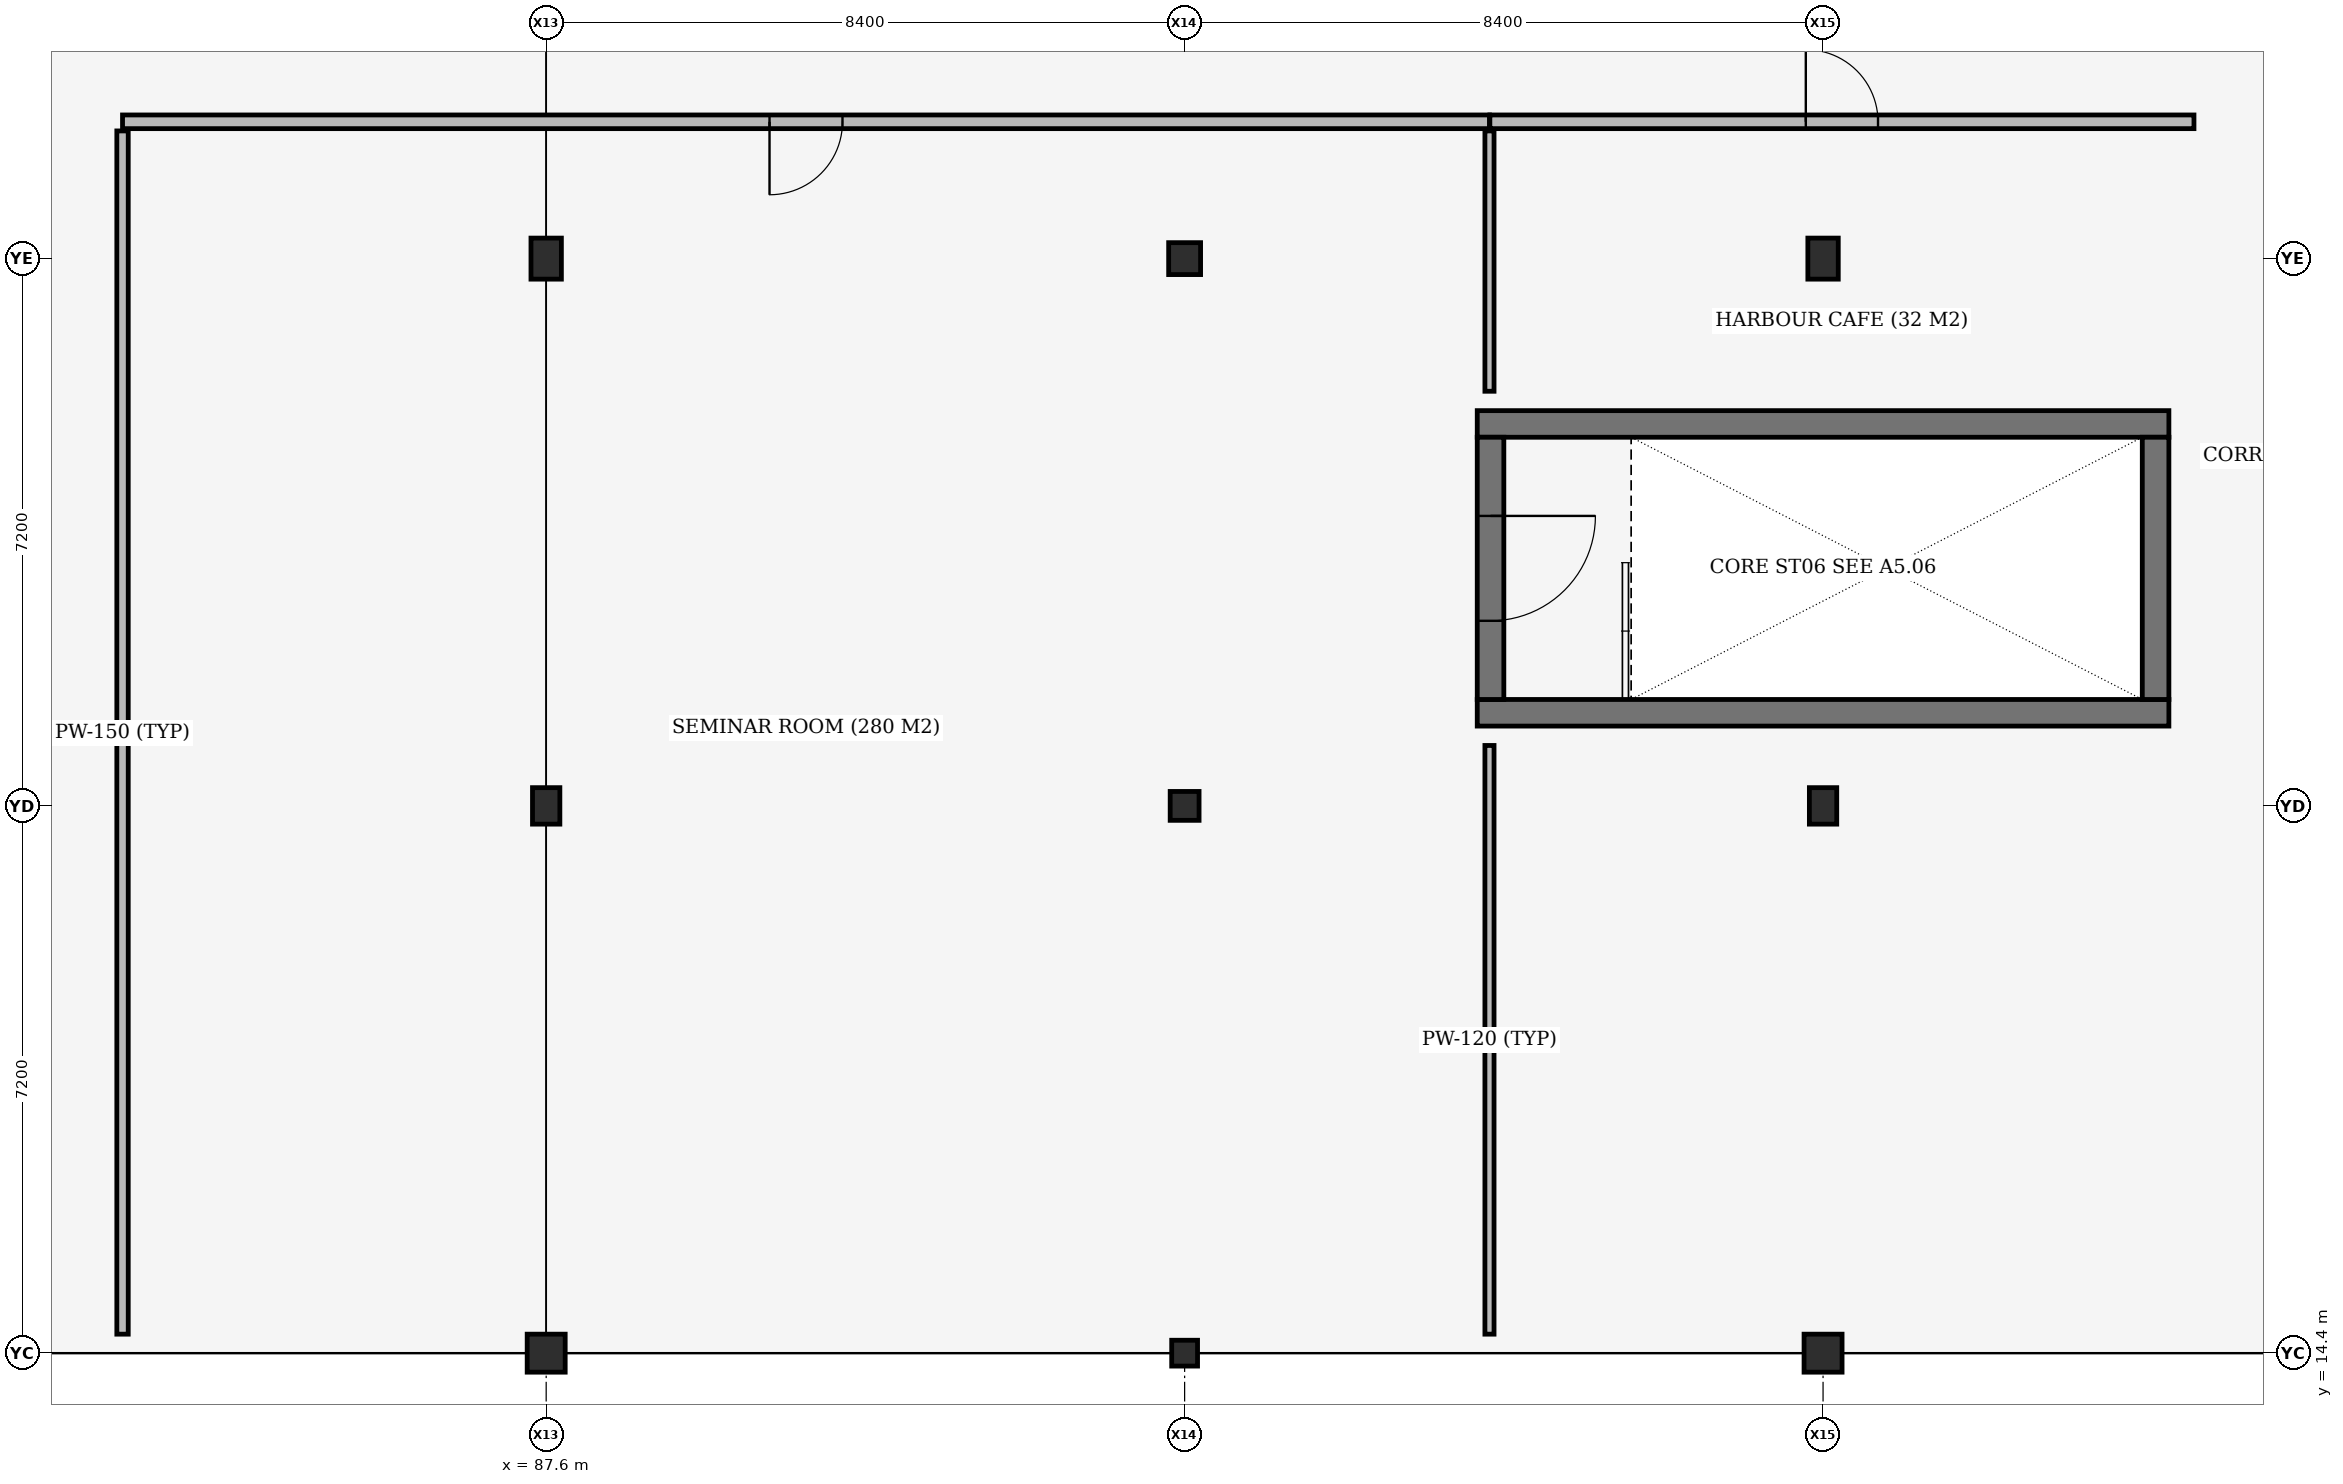
"""IFC4 building model, lengths in metres.
Left out: names, types, materials, properties, quantities, classifications, styles, units other than length and angle.
Written with IfcOpenShell. Run it as: python <this file> out.ifc"""

import sys

from ifc_helpers import new_model, si_unit, direction, frame, frame_2d, origin, origin_2d, place, context, subcontext, project, spatial, rectangle, extrude, element, fill, save


model = new_model("IFC4")
c1 = context("Model", 3, precision=1e-05, world=origin(), true_north=direction((0.0, 1.0)))
c2 = subcontext(c1, "Body", "Model", "MODEL_VIEW")
j1 = project(units=[si_unit("LENGTHUNIT", "METRE"), si_unit("PLANEANGLEUNIT", "RADIAN")], contexts=[c1])
p1 = place(None, origin())
s1 = spatial("IfcSite", under=j1, at=p1, CompositionType="ELEMENT")
p2 = place(p1, origin())
s2 = spatial("IfcBuilding", under=s1, at=p2, CompositionType="ELEMENT")
p3 = place(p2, frame((0.0, 0.0, 9.6)))
s3 = spatial("IfcBuildingStorey", under=s2, at=p3, CompositionType="ELEMENT", Elevation=9.6)
p4 = place(p3, frame((87.6, 14.4, 0.0), z_axis=(0.0, 0.0, 1.0), x_axis=(1.0, 0.0, 0.0)))
e1 = element("IfcColumn", 1, at=p4, inside=s3, PredefinedType="COLUMN", context=c2, shape_type="SweptSolid", body=[
    extrude(rectangle(XDim=0.5, YDim=0.5, at=origin_2d()), origin(), (0.0, 0.0, 1.0), 3.96),
])
p5 = place(p3, frame((87.6, 21.6, 0.0), z_axis=(0.0, 0.0, 1.0), x_axis=(1.0, 0.0, 0.0)))
e2 = element("IfcColumn", 2, at=p5, inside=s3, PredefinedType="COLUMN", context=c2, shape_type="SweptSolid", body=[
    extrude(rectangle(XDim=0.36, YDim=0.48, at=origin_2d()), origin(), (0.0, 0.0, 1.0), 3.96),
])
p6 = place(p3, frame((87.6, 28.8, 0.0), z_axis=(0.0, 0.0, 1.0), x_axis=(1.0, 0.0, 0.0)))
e3 = element("IfcColumn", 3, at=p6, inside=s3, PredefinedType="COLUMN", context=c2, shape_type="SweptSolid", body=[
    extrude(rectangle(XDim=0.4, YDim=0.54, at=origin_2d()), origin(), (0.0, 0.0, 1.0), 3.96),
])
p7 = place(p3, frame((96.0, 14.4, 0.0), z_axis=(0.0, 0.0, 1.0), x_axis=(1.0, 0.0, 0.0)))
e4 = element("IfcColumn", 4, at=p7, inside=s3, PredefinedType="COLUMN", context=c2, shape_type="SweptSolid", body=[
    extrude(rectangle(XDim=0.34, YDim=0.34, at=origin_2d()), origin(), (0.0, 0.0, 1.0), 3.96),
])
p8 = place(p3, frame((96.0, 21.6, 0.0), z_axis=(0.0, 0.0, 1.0), x_axis=(1.0, 0.0, 0.0)))
e5 = element("IfcColumn", 5, at=p8, inside=s3, PredefinedType="COLUMN", context=c2, shape_type="SweptSolid", body=[
    extrude(rectangle(XDim=0.38, YDim=0.38, at=origin_2d()), origin(), (0.0, 0.0, 1.0), 3.96),
])
p9 = place(p3, frame((96.0, 28.8, 0.0), z_axis=(0.0, 0.0, 1.0), x_axis=(1.0, 0.0, 0.0)))
e6 = element("IfcColumn", 6, at=p9, inside=s3, PredefinedType="COLUMN", context=c2, shape_type="SweptSolid", body=[
    extrude(rectangle(XDim=0.42, YDim=0.42, at=origin_2d()), origin(), (0.0, 0.0, 1.0), 3.96),
])
p10 = place(p3, frame((104.4, 14.4, 0.0), z_axis=(0.0, 0.0, 1.0), x_axis=(1.0, 0.0, 0.0)))
e7 = element("IfcColumn", 7, at=p10, inside=s3, PredefinedType="COLUMN", context=c2, shape_type="SweptSolid", body=[
    extrude(rectangle(XDim=0.5, YDim=0.5, at=origin_2d()), origin(), (0.0, 0.0, 1.0), 3.96),
])
p11 = place(p3, frame((104.4, 21.6, 0.0), z_axis=(0.0, 0.0, 1.0), x_axis=(1.0, 0.0, 0.0)))
e8 = element("IfcColumn", 8, at=p11, inside=s3, PredefinedType="COLUMN", context=c2, shape_type="SweptSolid", body=[
    extrude(rectangle(XDim=0.36, YDim=0.48, at=origin_2d()), origin(), (0.0, 0.0, 1.0), 3.96),
])
p12 = place(p3, frame((104.4, 28.8, 0.0), z_axis=(0.0, 0.0, 1.0), x_axis=(1.0, 0.0, 0.0)))
e9 = element("IfcColumn", 9, at=p12, inside=s3, PredefinedType="COLUMN", context=c2, shape_type="SweptSolid", body=[
    extrude(rectangle(XDim=0.4, YDim=0.54, at=origin_2d()), origin(), (0.0, 0.0, 1.0), 3.96),
])
for number, where, z_axis, x_axis in (
    (10, (99.85, 22.825, 0.0), (0.0, 0.0, 1.0), (1.0, 0.0, 0.0)),
    (11, (108.95, 26.625, 0.0), (0.0, 0.0, 1.0), (-1.0, 0.0, 0.0)),
):
    element("IfcWall", number, at=place(p3, frame(where, z_axis=z_axis, x_axis=x_axis)), inside=s3, PredefinedType="SHEAR", context=c2, shape_type="SweptSolid", body=[
        extrude(rectangle(XDim=9.1, YDim=0.35, at=frame_2d((4.55, 0.0))), origin(), (0.0, 0.0, 1.0), 3.96),
    ])
p13 = place(p3, frame((108.775, 23.0, 0.0), z_axis=(0.0, 0.0, 1.0), x_axis=(0.0, 1.0, 0.0)))
e12 = element("IfcWall", 12, at=p13, inside=s3, PredefinedType="SHEAR", context=c2, shape_type="SweptSolid", body=[
    extrude(rectangle(XDim=3.45, YDim=0.35, at=frame_2d((1.725, 0.0))), origin(), (0.0, 0.0, 1.0), 3.96),
])
p14 = place(p3, frame((100.025, 26.45, 0.0), z_axis=(0.0, 0.0, 1.0), x_axis=(0.0, -1.0, 0.0)))
e13 = element("IfcWall", 13, at=p14, inside=s3, PredefinedType="SHEAR", context=c2, shape_type="SweptSolid", body=[
    extrude(rectangle(XDim=3.45, YDim=0.35, at=frame_2d((1.725, 0.0))), origin(), (0.0, 0.0, 1.0), 3.96),
])
p15 = place(p14, frame((1.035, 0.0, 0.0)))
e14 = element("IfcOpeningElement", 14, at=p15, cuts=e13, PredefinedType="OPENING", context=c2, shape_type="SweptSolid", body=[
    extrude(rectangle(XDim=1.38, YDim=2.2, at=frame_2d((0.69, 1.1))), frame((0.0, 0.185, 0.0), z_axis=(0.0, -1.0, 0.0), x_axis=(1.0, 0.0, 0.0)), (0.0, 0.0, 1.0), 0.37),
])
p16 = place(p3, frame((82.026, 14.65, 0.0), z_axis=(0.0, 0.0, 1.0), x_axis=(0.0, 1.0, 0.0)))
e15 = element("IfcWall", 15, at=p16, inside=s3, PredefinedType="PARTITIONING", context=c2, shape_type="SweptSolid", body=[
    extrude(rectangle(XDim=15.83, YDim=0.15, at=frame_2d((7.915, 0.0))), origin(), (0.0, 0.0, 1.0), 3.935),
])
p17 = place(p3, frame((82.026, 30.6, 0.0), z_axis=(0.0, 0.0, 1.0), x_axis=(1.0, 0.0, 0.0)))
e16 = element("IfcWall", 16, at=p17, inside=s3, PredefinedType="PARTITIONING", context=c2, shape_type="SweptSolid", body=[
    extrude(rectangle(XDim=17.985, YDim=0.18, at=frame_2d((8.993, 0.0))), origin(), (0.0, 0.0, 1.0), 3.935),
])
p18 = place(p17, frame((8.512, 0.0, 0.0)))
e17 = element("IfcOpeningElement", 17, at=p18, cuts=e16, PredefinedType="OPENING", context=c2, shape_type="SweptSolid", body=[
    extrude(rectangle(XDim=0.96, YDim=2.15, at=frame_2d((0.48, 1.075))), frame((0.0, 0.1, 0.0), z_axis=(0.0, -1.0, 0.0), x_axis=(1.0, 0.0, 0.0)), (0.0, 0.0, 1.0), 0.2),
])
p19 = place(p3, frame((100.011, 14.65, 0.0), z_axis=(0.0, 0.0, 1.0), x_axis=(0.0, 1.0, 0.0)))
e18 = element("IfcWall", 18, at=p19, inside=s3, PredefinedType="PARTITIONING", context=c2, shape_type="SweptSolid", body=[
    extrude(rectangle(XDim=7.745, YDim=0.12, at=frame_2d((3.873, 0.0))), origin(), (0.0, 0.0, 1.0), 3.935),
])
p20 = place(p3, frame((100.016, 30.6, 0.0), z_axis=(0.0, 0.0, 1.0), x_axis=(1.0, 0.0, 0.0)))
e19 = element("IfcWall", 19, at=p20, inside=s3, PredefinedType="PARTITIONING", context=c2, shape_type="SweptSolid", body=[
    extrude(rectangle(XDim=9.264, YDim=0.18, at=frame_2d((4.632, 0.0))), origin(), (0.0, 0.0, 1.0), 3.935),
])
p21 = place(p20, frame((4.157, 0.0, 0.0)))
e20 = element("IfcOpeningElement", 20, at=p21, cuts=e19, PredefinedType="OPENING", context=c2, shape_type="SweptSolid", body=[
    extrude(rectangle(XDim=0.95, YDim=2.15, at=frame_2d((0.475, 1.075))), frame((0.0, 0.1, 0.0), z_axis=(0.0, -1.0, 0.0), x_axis=(1.0, 0.0, 0.0)), (0.0, 0.0, 1.0), 0.2),
])
p22 = place(p3, frame((100.011, 27.055, 0.0), z_axis=(0.0, 0.0, 1.0), x_axis=(0.0, 1.0, 0.0)))
e21 = element("IfcWall", 21, at=p22, inside=s3, PredefinedType="PARTITIONING", context=c2, shape_type="SweptSolid", body=[
    extrude(rectangle(XDim=3.425, YDim=0.12, at=frame_2d((1.712, 0.0))), origin(), (0.0, 0.0, 1.0), 3.935),
])
p23 = place(p15, origin())
e22 = element("IfcDoor", 22, at=p23, inside=s3, OperationType="DOUBLE_DOOR_SINGLE_SWING", PredefinedType="DOOR", context=c2, shape_type="SweptSolid", body=[
    extrude(rectangle(XDim=1.38, YDim=2.2, at=frame_2d((0.69, 1.1))), frame((0.0, 0.025, 0.0), z_axis=(0.0, -1.0, 0.0), x_axis=(1.0, 0.0, 0.0)), (0.0, 0.0, 1.0), 0.05),
])
fill(e14, e22)
p24 = place(p18, origin())
e23 = element("IfcDoor", 23, at=p24, inside=s3, OperationType="SINGLE_SWING_RIGHT", PredefinedType="DOOR", context=c2, shape_type="SweptSolid", body=[
    extrude(rectangle(XDim=0.96, YDim=2.15, at=frame_2d((0.48, 1.075))), frame((0.0, 0.025, 0.0), z_axis=(0.0, -1.0, 0.0), x_axis=(1.0, 0.0, 0.0)), (0.0, 0.0, 1.0), 0.05),
])
fill(e17, e23)
p25 = place(p21, origin())
e24 = element("IfcDoor", 24, at=p25, inside=s3, OperationType="SINGLE_SWING_LEFT", PredefinedType="DOOR", context=c2, shape_type="SweptSolid", body=[
    extrude(rectangle(XDim=0.95, YDim=2.15, at=frame_2d((0.475, 1.075))), frame((0.0, 0.025, 0.0), z_axis=(0.0, -1.0, 0.0), x_axis=(1.0, 0.0, 0.0)), (0.0, 0.0, 1.0), 0.05),
])
fill(e20, e24)
save(model, sys.argv[1])
